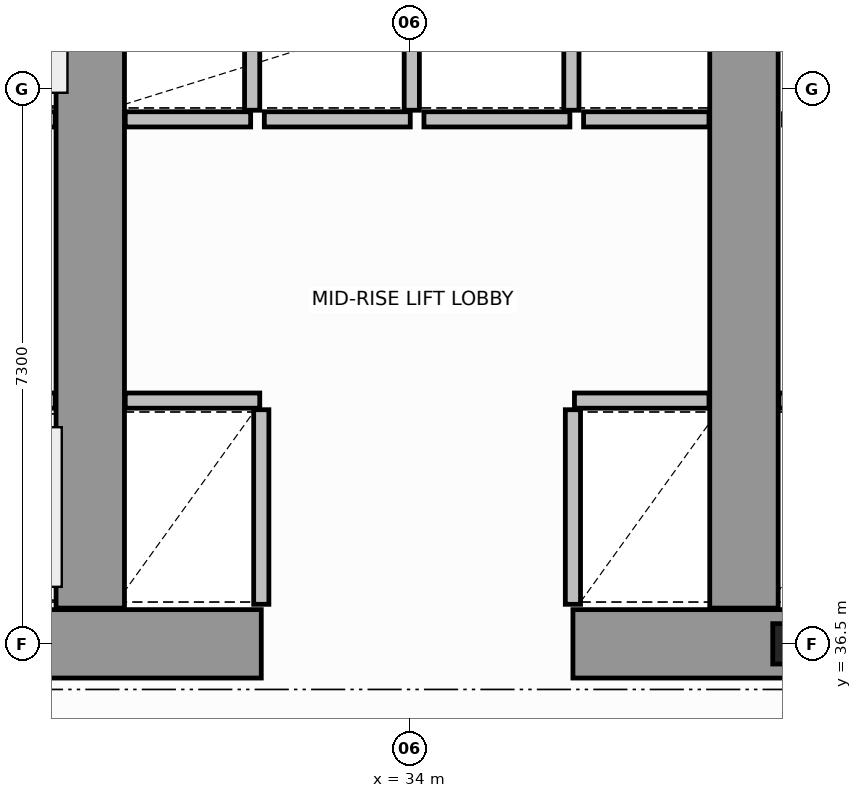
"""IFC4 building model, lengths in metres.
Left out: names, types, materials, properties, quantities, classifications, styles, units other than length and angle.
Written with IfcOpenShell. Run it as: python <this file> out.ifc"""

import sys

from ifc_helpers import new_model, si_unit, direction, frame, frame_2d, origin, origin_2d, place, context, subcontext, project, spatial, rectangle, i_section, extrude, source, transform, mapped, element, save


model = new_model("IFC4")
c1 = context("Model", 3, precision=1e-05, world=origin(), true_north=direction((0.0, 1.0)))
c2 = subcontext(c1, "Body", "Model", "MODEL_VIEW")
j1 = project(units=[si_unit("LENGTHUNIT", "METRE"), si_unit("PLANEANGLEUNIT", "RADIAN")], contexts=[c1])
p1 = place(None, origin())
s1 = spatial("IfcSite", under=j1, at=p1, CompositionType="ELEMENT")
p2 = place(p1, origin())
s2 = spatial("IfcBuilding", under=s1, at=p2, CompositionType="ELEMENT")
p3 = place(p2, frame((0.0, 0.0, 72.0)))
s3 = spatial("IfcBuildingStorey", under=s2, at=p3, CompositionType="ELEMENT", Elevation=72.0)
m1 = source(origin(), c2, "Body", "SweptSolid", [
    extrude(i_section(OverallWidth=0.442, OverallDepth=0.531, WebThickness=0.065, FlangeThickness=0.076, FilletRadius=0.015, at=origin_2d()), origin(), (0.0, 0.0, 1.0), 3.8),
])
p4 = place(p3, frame((39.0, 36.5, 0.0), z_axis=(0.0, 0.0, 1.0), x_axis=(1.0, 0.0, 0.0)))
e1 = element("IfcColumn", 1, at=p4, inside=s3, PredefinedType="COLUMN", context=c2, shape_type="MappedRepresentation", body=[
    mapped(m1, transform((0.0, 0.0, 0.0), scale=1.0)),
])
for number, where, z_axis, x_axis in (
    (2, (27.55, 36.5, 0.0), (0.0, 0.0, 1.0), (1.0, 0.0, 0.0)),
    (3, (36.15, 36.5, 0.0), (0.0, 0.0, 1.0), (1.0, 0.0, 0.0)),
):
    element("IfcWall", number, at=place(p3, frame(where, z_axis=z_axis, x_axis=x_axis)), inside=s3, PredefinedType="SHEAR", context=c2, shape_type="SweptSolid", body=[
        extrude(rectangle(XDim=4.5, YDim=0.9, at=frame_2d((2.25, 0.0))), origin(), (0.0, 0.0, 1.0), 3.8),
    ])
for number, where, z_axis, x_axis in (
    (4, (29.8, 36.97, 0.0), (0.0, 0.0, 1.0), (0.0, 1.0, 0.0)),
    (5, (38.4, 36.97, 0.0), (0.0, 0.0, 1.0), (0.0, 1.0, 0.0)),
):
    element("IfcWall", number, at=place(p3, frame(where, z_axis=z_axis, x_axis=x_axis)), inside=s3, PredefinedType="SHEAR", context=c2, shape_type="SweptSolid", body=[
        extrude(rectangle(XDim=9.23, YDim=0.9, at=frame_2d((4.615, 0.0))), origin(), (0.0, 0.0, 1.0), 3.8),
    ])
p5 = place(p3, frame((27.57, 39.7, 0.0), z_axis=(0.0, 0.0, 1.0), x_axis=(1.0, 0.0, 0.0)))
e6 = element("IfcWall", 6, at=p5, inside=s3, PredefinedType="SOLIDWALL", context=c2, shape_type="SweptSolid", body=[
    extrude(rectangle(XDim=1.77, YDim=0.2, at=frame_2d((0.885, 0.0))), origin(), (0.0, 0.0, 1.0), 3.58),
])
p6 = place(p5, frame((0.335, 0.0, 0.0)))
e7 = element("IfcOpeningElement", 7, at=p6, cuts=e6, PredefinedType="OPENING", context=c2, shape_type="SweptSolid", body=[
    extrude(rectangle(XDim=1.1, YDim=2.15, at=frame_2d((0.55, 1.075))), frame((0.0, 0.11, 0.0), z_axis=(0.0, -1.0, 0.0), x_axis=(1.0, 0.0, 0.0)), (0.0, 0.0, 1.0), 0.22),
])
p7 = place(p3, frame((27.69, 43.4, 0.0), z_axis=(0.0, 0.0, 1.0), x_axis=(1.0, 0.0, 0.0)))
e8 = element("IfcWall", 8, at=p7, inside=s3, PredefinedType="SOLIDWALL", context=c2, shape_type="SweptSolid", body=[
    extrude(rectangle(XDim=1.65, YDim=0.2, at=frame_2d((0.825, 0.0))), origin(), (0.0, 0.0, 1.0), 3.58),
])
p8 = place(p7, frame((0.275, 0.0, 0.0)))
e9 = element("IfcOpeningElement", 9, at=p8, cuts=e8, PredefinedType="OPENING", context=c2, shape_type="SweptSolid", body=[
    extrude(rectangle(XDim=1.1, YDim=2.15, at=frame_2d((0.55, 1.075))), frame((0.0, 0.11, 0.0), z_axis=(0.0, -1.0, 0.0), x_axis=(1.0, 0.0, 0.0)), (0.0, 0.0, 1.0), 0.22),
])
p9 = place(p3, frame((30.26, 39.7, 0.0), z_axis=(0.0, 0.0, 1.0), x_axis=(1.0, 0.0, 0.0)))
e10 = element("IfcWall", 10, at=p9, inside=s3, PredefinedType="SOLIDWALL", context=c2, shape_type="SweptSolid", body=[
    extrude(rectangle(XDim=1.77, YDim=0.2, at=frame_2d((0.885, 0.0))), origin(), (0.0, 0.0, 1.0), 3.58),
])
p10 = place(p3, frame((32.05, 37.02, 0.0), z_axis=(0.0, 0.0, 1.0), x_axis=(0.0, 1.0, 0.0)))
e11 = element("IfcWall", 11, at=p10, inside=s3, PredefinedType="SOLIDWALL", context=c2, shape_type="SweptSolid", body=[
    extrude(rectangle(XDim=2.56, YDim=0.2, at=frame_2d((1.28, 0.0))), origin(), (0.0, 0.0, 1.0), 3.58),
])
p11 = place(p3, frame((36.17, 39.7, 0.0), z_axis=(0.0, 0.0, 1.0), x_axis=(1.0, 0.0, 0.0)))
e12 = element("IfcWall", 12, at=p11, inside=s3, PredefinedType="SOLIDWALL", context=c2, shape_type="SweptSolid", body=[
    extrude(rectangle(XDim=1.77, YDim=0.2, at=frame_2d((0.885, 0.0))), origin(), (0.0, 0.0, 1.0), 3.58),
])
p12 = place(p3, frame((36.15, 37.02, 0.0), z_axis=(0.0, 0.0, 1.0), x_axis=(0.0, 1.0, 0.0)))
e13 = element("IfcWall", 13, at=p12, inside=s3, PredefinedType="SOLIDWALL", context=c2, shape_type="SweptSolid", body=[
    extrude(rectangle(XDim=2.56, YDim=0.2, at=frame_2d((1.28, 0.0))), origin(), (0.0, 0.0, 1.0), 3.58),
])
p13 = place(p3, frame((30.26, 43.4, 0.0), z_axis=(0.0, 0.0, 1.0), x_axis=(1.0, 0.0, 0.0)))
e14 = element("IfcWall", 14, at=p13, inside=s3, PredefinedType="SOLIDWALL", context=c2, shape_type="SweptSolid", body=[
    extrude(rectangle(XDim=1.65, YDim=0.2, at=frame_2d((0.825, 0.0))), origin(), (0.0, 0.0, 1.0), 3.58),
])
p14 = place(p3, frame((31.93, 43.52, 0.0), z_axis=(0.0, 0.0, 1.0), x_axis=(0.0, 1.0, 0.0)))
e15 = element("IfcWall", 15, at=p14, inside=s3, PredefinedType="SOLIDWALL", context=c2, shape_type="SweptSolid", body=[
    extrude(rectangle(XDim=2.56, YDim=0.2, at=frame_2d((1.28, 0.0))), origin(), (0.0, 0.0, 1.0), 3.58),
])
p15 = place(p3, frame((32.09, 43.4, 0.0), z_axis=(0.0, 0.0, 1.0), x_axis=(1.0, 0.0, 0.0)))
e16 = element("IfcWall", 16, at=p15, inside=s3, PredefinedType="SOLIDWALL", context=c2, shape_type="SweptSolid", body=[
    extrude(rectangle(XDim=1.92, YDim=0.2, at=frame_2d((0.96, 0.0))), origin(), (0.0, 0.0, 1.0), 3.58),
])
p16 = place(p3, frame((34.03, 43.52, 0.0), z_axis=(0.0, 0.0, 1.0), x_axis=(0.0, 1.0, 0.0)))
e17 = element("IfcWall", 17, at=p16, inside=s3, PredefinedType="SOLIDWALL", context=c2, shape_type="SweptSolid", body=[
    extrude(rectangle(XDim=2.56, YDim=0.2, at=frame_2d((1.28, 0.0))), origin(), (0.0, 0.0, 1.0), 3.58),
])
p17 = place(p3, frame((34.19, 43.4, 0.0), z_axis=(0.0, 0.0, 1.0), x_axis=(1.0, 0.0, 0.0)))
e18 = element("IfcWall", 18, at=p17, inside=s3, PredefinedType="SOLIDWALL", context=c2, shape_type="SweptSolid", body=[
    extrude(rectangle(XDim=1.92, YDim=0.2, at=frame_2d((0.96, 0.0))), origin(), (0.0, 0.0, 1.0), 3.58),
])
p18 = place(p3, frame((36.13, 43.52, 0.0), z_axis=(0.0, 0.0, 1.0), x_axis=(0.0, 1.0, 0.0)))
e19 = element("IfcWall", 19, at=p18, inside=s3, PredefinedType="SOLIDWALL", context=c2, shape_type="SweptSolid", body=[
    extrude(rectangle(XDim=2.56, YDim=0.2, at=frame_2d((1.28, 0.0))), origin(), (0.0, 0.0, 1.0), 3.58),
])
p19 = place(p3, frame((36.29, 43.4, 0.0), z_axis=(0.0, 0.0, 1.0), x_axis=(1.0, 0.0, 0.0)))
e20 = element("IfcWall", 20, at=p19, inside=s3, PredefinedType="SOLIDWALL", context=c2, shape_type="SweptSolid", body=[
    extrude(rectangle(XDim=1.65, YDim=0.2, at=frame_2d((0.825, 0.0))), origin(), (0.0, 0.0, 1.0), 3.58),
])
p20 = place(p3, frame((38.86, 39.7, 0.0), z_axis=(0.0, 0.0, 1.0), x_axis=(1.0, 0.0, 0.0)))
e21 = element("IfcWall", 21, at=p20, inside=s3, PredefinedType="SOLIDWALL", context=c2, shape_type="SweptSolid", body=[
    extrude(rectangle(XDim=1.77, YDim=0.2, at=frame_2d((0.885, 0.0))), origin(), (0.0, 0.0, 1.0), 3.58),
])
save(model, sys.argv[1])
